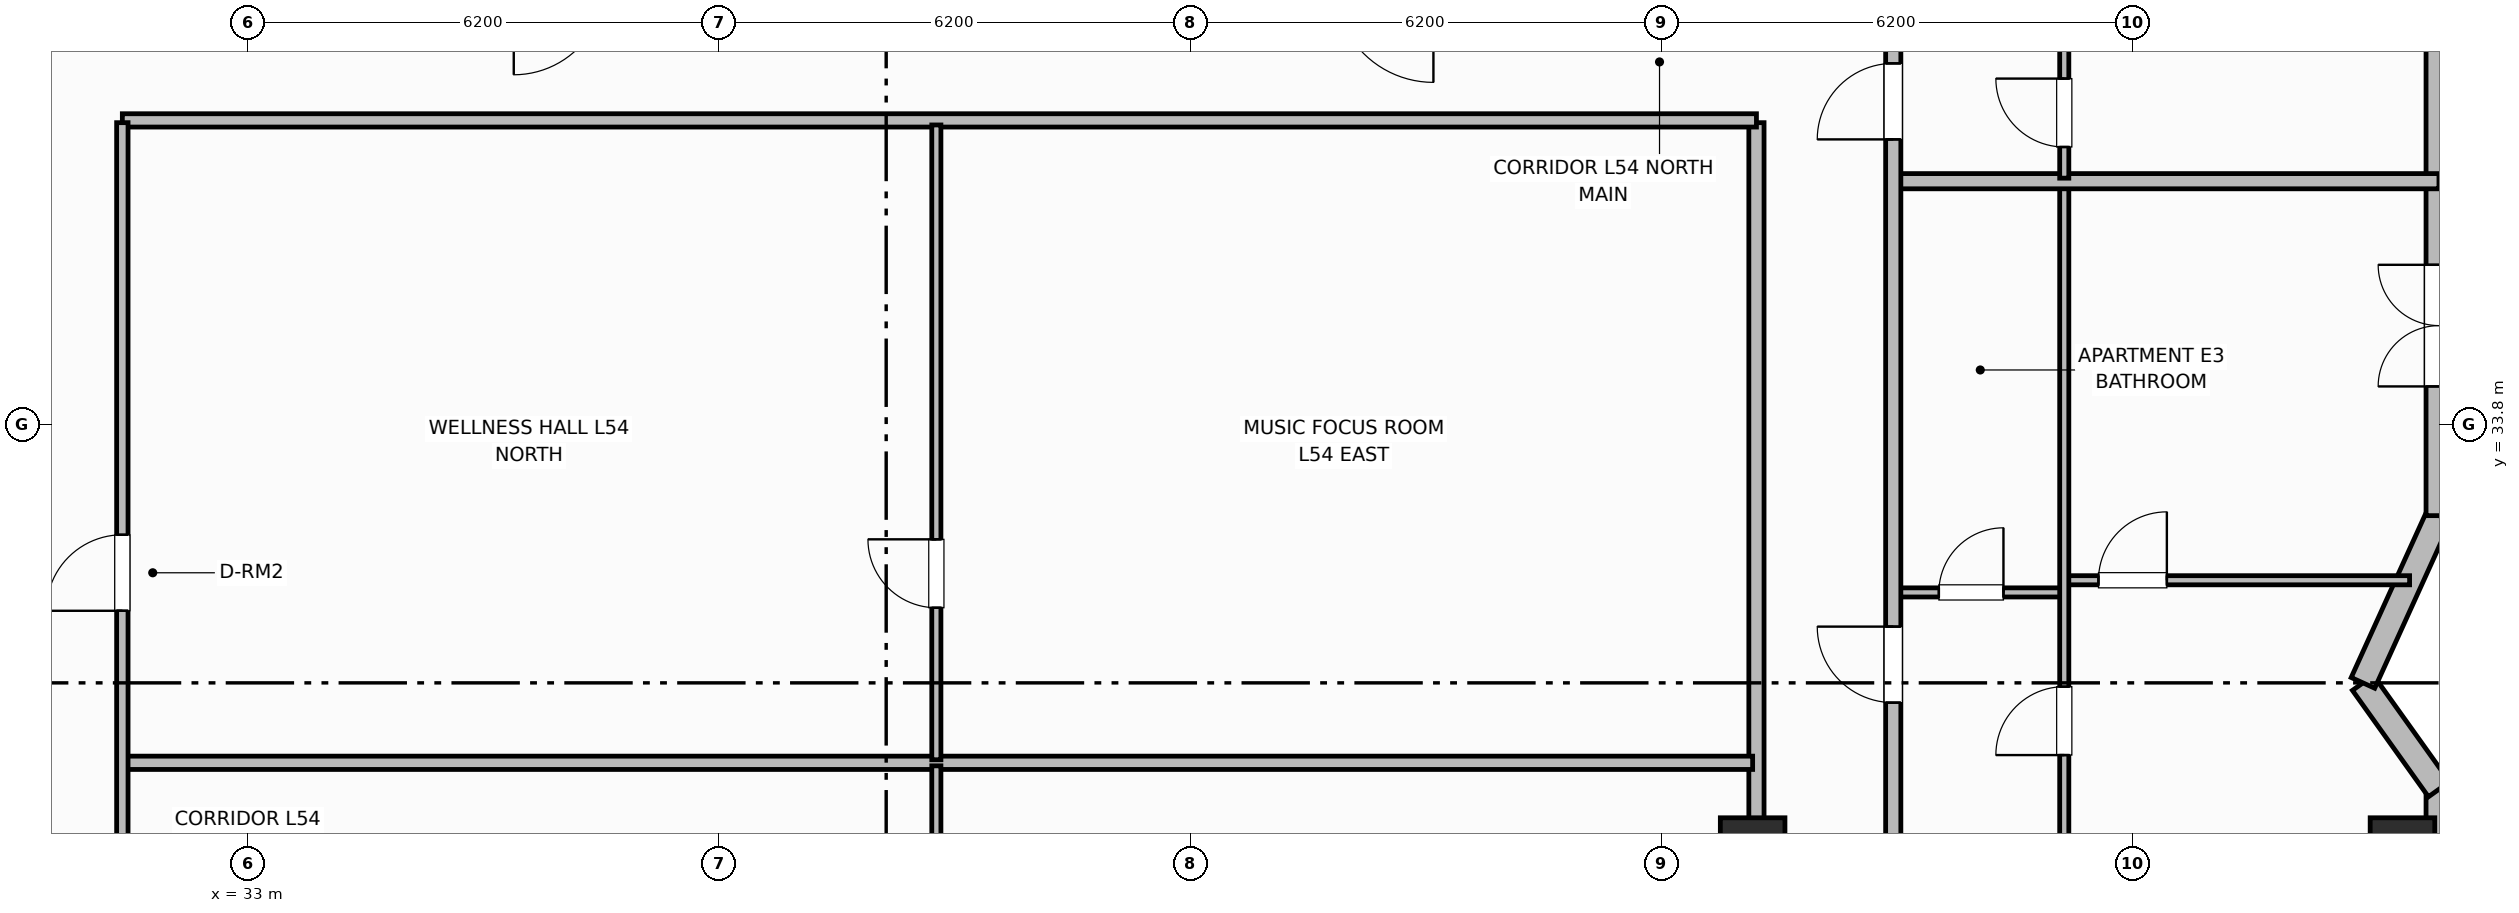
"""IFC4 building model, lengths in metres.
Left out: names, types, materials, properties, quantities, classifications, styles, units other than length and angle.
Written with IfcOpenShell. Run it as: python <this file> out.ifc"""

import sys

from ifc_helpers import new_model, si_unit, direction, frame, frame_2d, origin, origin_2d, place, context, subcontext, project, spatial, rectangle, extrude, element, fill, save


model = new_model("IFC4")
c1 = context("Model", 3, precision=1e-05, world=origin(), true_north=direction((0.0, 1.0)))
c2 = subcontext(c1, "Body", "Model", "MODEL_VIEW")
j1 = project(units=[si_unit("LENGTHUNIT", "METRE"), si_unit("PLANEANGLEUNIT", "RADIAN")], contexts=[c1])
p1 = place(None, origin())
s1 = spatial("IfcSite", under=j1, at=p1, CompositionType="ELEMENT")
p2 = place(p1, origin())
s2 = spatial("IfcBuilding", under=s1, at=p2, CompositionType="ELEMENT")
p3 = place(p2, frame((0.0, 0.0, 218.4)))
s3 = spatial("IfcBuildingStorey", under=s2, at=p3, CompositionType="ELEMENT", Elevation=218.4)
for number, where, z_axis, x_axis in (
    (1, (52.8, 28.2, 0.0), (0.0, 0.0, 1.0), (1.0, 0.0, 0.0)),
    (2, (61.35, 28.2, 0.0), (0.0, 0.0, 1.0), (1.0, 0.0, 0.0)),
):
    element("IfcColumn", number, at=place(p3, frame(where, z_axis=z_axis, x_axis=x_axis)), inside=s3, PredefinedType="COLUMN", context=c2, shape_type="SweptSolid", body=[
        extrude(rectangle(XDim=0.85, YDim=0.85, at=origin_2d()), origin(), (0.0, 0.0, 1.0), 3.7),
    ])
p4 = place(p3, frame((61.83, 27.4, 0.0), z_axis=(0.0, 0.0, 1.0), x_axis=(0.0, 1.0, 0.0)))
e3 = element("IfcWall", 3, at=p4, inside=s3, PredefinedType="SOLIDWALL", context=c2, shape_type="SweptSolid", body=[
    extrude(rectangle(XDim=1.6, YDim=0.34, at=frame_2d((0.8, 0.0))), origin(), (0.0, 0.0, 1.0), 2.72),
])
p5 = place(p3, frame((61.83, 29.0, 0.0), z_axis=(0.0, 0.0, 1.0), x_axis=(-0.581265041318, 0.813714293681, 0.0)))
e4 = element("IfcWall", 4, at=p5, inside=s3, PredefinedType="SOLIDWALL", context=c2, shape_type="SweptSolid", body=[
    extrude(rectangle(XDim=1.72, YDim=0.34, at=frame_2d((0.86, 0.0))), origin(), (0.0, 0.0, 1.0), 2.72),
])
p6 = place(p3, frame((60.83, 30.4, 0.0), z_axis=(0.0, 0.0, 1.0), x_axis=(0.413772500085, 0.910380315128, 0.0)))
e5 = element("IfcWall", 5, at=p6, inside=s3, PredefinedType="SOLIDWALL", context=c2, shape_type="SweptSolid", body=[
    extrude(rectangle(XDim=2.417, YDim=0.34, at=frame_2d((1.208, 0.0))), origin(), (0.0, 0.0, 1.0), 2.72),
])
p7 = place(p3, frame((61.83, 32.6, 0.0), z_axis=(0.0, 0.0, 1.0), x_axis=(0.0, 1.0, 0.0)))
e6 = element("IfcWall", 6, at=p7, inside=s3, PredefinedType="SOLIDWALL", context=c2, shape_type="SweptSolid", body=[
    extrude(rectangle(XDim=13.3, YDim=0.34, at=frame_2d((6.65, 0.0))), origin(), (0.0, 0.0, 1.0), 2.72),
])
p8 = place(p7, frame((1.7, 0.0, 0.0)))
e7 = element("IfcOpeningElement", 7, at=p8, cuts=e6, PredefinedType="OPENING", context=c2, shape_type="SweptSolid", body=[
    extrude(rectangle(XDim=1.6, YDim=2.1, at=frame_2d((0.8, 1.05))), frame((0.0, 0.18, 0.0), z_axis=(0.0, -1.0, 0.0), x_axis=(1.0, 0.0, 0.0)), (0.0, 0.0, 1.0), 0.36),
])
p9 = place(p7, frame((9.85, 0.0, 0.7)))
e8 = element("IfcOpeningElement", 8, at=p9, cuts=e6, PredefinedType="OPENING", context=c2, shape_type="SweptSolid", body=[
    extrude(rectangle(XDim=1.6, YDim=1.9, at=frame_2d((0.8, 0.95))), frame((0.0, 0.18, 0.0), z_axis=(0.0, -1.0, 0.0), x_axis=(1.0, 0.0, 0.0)), (0.0, 0.0, 1.0), 0.36),
])
p10 = place(p3, frame((52.85, 18.63, 0.0), z_axis=(0.0, 0.0, 1.0), x_axis=(0.0, 1.0, 0.0)))
e9 = element("IfcWall", 9, at=p10, inside=s3, PredefinedType="PARTITIONING", context=c2, shape_type="SweptSolid", body=[
    extrude(rectangle(XDim=19.14, YDim=0.2, at=frame_2d((9.57, 0.0))), origin(), (0.0, 0.0, 1.0), 2.55),
])
p11 = place(p3, frame((31.35, 37.8, 0.0), z_axis=(0.0, 0.0, 1.0), x_axis=(1.0, 0.0, 0.0)))
e10 = element("IfcWall", 10, at=p11, inside=s3, PredefinedType="PARTITIONING", context=c2, shape_type="SweptSolid", body=[
    extrude(rectangle(XDim=21.5, YDim=0.175, at=frame_2d((10.75, 0.0))), origin(), (0.0, 0.0, 1.0), 2.55),
])
p12 = place(p3, frame((31.38, 29.348, 0.0), z_axis=(0.0, 0.0, 1.0), x_axis=(1.0, 0.0, 0.0)))
e11 = element("IfcWall", 11, at=p12, inside=s3, PredefinedType="PARTITIONING", context=c2, shape_type="SweptSolid", body=[
    extrude(rectangle(XDim=21.42, YDim=0.175, at=frame_2d((10.71, 0.0))), origin(), (0.0, 0.0, 1.0), 2.55),
])
p13 = place(p3, frame((42.06, 18.66, 0.0), z_axis=(0.0, 0.0, 1.0), x_axis=(0.0, 1.0, 0.0)))
e12 = element("IfcWall", 12, at=p13, inside=s3, PredefinedType="PARTITIONING", context=c2, shape_type="SweptSolid", body=[
    extrude(rectangle(XDim=10.648, YDim=0.12, at=frame_2d((5.324, 0.0))), origin(), (0.0, 0.0, 1.0), 2.55),
])
p14 = place(p13, frame((2.0, 0.0, 0.0)))
e13 = element("IfcOpeningElement", 13, at=p14, cuts=e12, PredefinedType="OPENING", context=c2, shape_type="SweptSolid", body=[
    extrude(rectangle(XDim=0.9, YDim=2.1, at=frame_2d((0.45, 1.05))), frame((0.0, 0.07, 0.0), z_axis=(0.0, -1.0, 0.0), x_axis=(1.0, 0.0, 0.0)), (0.0, 0.0, 1.0), 0.14),
])
p15 = place(p3, frame((42.06, 29.388, 0.0), z_axis=(0.0, 0.0, 1.0), x_axis=(0.0, 1.0, 0.0)))
e14 = element("IfcWall", 14, at=p15, inside=s3, PredefinedType="PARTITIONING", context=c2, shape_type="SweptSolid", body=[
    extrude(rectangle(XDim=8.352, YDim=0.12, at=frame_2d((4.176, 0.0))), origin(), (0.0, 0.0, 1.0), 2.55),
])
p16 = place(p15, frame((2.0, 0.0, 0.0)))
e15 = element("IfcOpeningElement", 15, at=p16, cuts=e14, PredefinedType="OPENING", context=c2, shape_type="SweptSolid", body=[
    extrude(rectangle(XDim=0.9, YDim=2.1, at=frame_2d((0.45, 1.05))), frame((0.0, 0.07, 0.0), z_axis=(0.0, -1.0, 0.0), x_axis=(1.0, 0.0, 0.0)), (0.0, 0.0, 1.0), 0.14),
])
p17 = place(p3, frame((31.35, 18.63, 0.0), z_axis=(0.0, 0.0, 1.0), x_axis=(0.0, 1.0, 0.0)))
e16 = element("IfcWall", 16, at=p17, inside=s3, PredefinedType="PARTITIONING", context=c2, shape_type="SweptSolid", body=[
    extrude(rectangle(XDim=19.14, YDim=0.15, at=frame_2d((9.57, 0.0))), origin(), (0.0, 0.0, 1.0), 2.55),
])
p18 = place(p17, frame((2.2, 0.0, 0.0)))
e17 = element("IfcOpeningElement", 17, at=p18, cuts=e16, PredefinedType="OPENING", context=c2, shape_type="SweptSolid", body=[
    extrude(rectangle(XDim=1.0, YDim=2.15, at=frame_2d((0.5, 1.075))), frame((0.0, 0.085, 0.0), z_axis=(0.0, -1.0, 0.0), x_axis=(1.0, 0.0, 0.0)), (0.0, 0.0, 1.0), 0.17),
])
p19 = place(p17, frame((12.719, 0.0, 0.0)))
e18 = element("IfcOpeningElement", 18, at=p19, cuts=e16, PredefinedType="OPENING", context=c2, shape_type="SweptSolid", body=[
    extrude(rectangle(XDim=1.0, YDim=2.15, at=frame_2d((0.5, 1.075))), frame((0.0, 0.085, 0.0), z_axis=(0.0, -1.0, 0.0), x_axis=(1.0, 0.0, 0.0)), (0.0, 0.0, 1.0), 0.17),
])
p20 = place(p3, frame((54.65, 31.59, 0.0), z_axis=(0.0, 0.0, 1.0), x_axis=(1.0, 0.0, 0.0)))
e19 = element("IfcWall", 19, at=p20, inside=s3, PredefinedType="PARTITIONING", context=c2, shape_type="SweptSolid", body=[
    extrude(rectangle(XDim=2.25, YDim=0.12, at=frame_2d((1.125, 0.0))), origin(), (0.0, 0.0, 1.0), 2.55),
])
p21 = place(p20, frame((0.6, 0.0, 0.0)))
e20 = element("IfcOpeningElement", 20, at=p21, cuts=e19, PredefinedType="OPENING", context=c2, shape_type="SweptSolid", body=[
    extrude(rectangle(XDim=0.85, YDim=2.1, at=frame_2d((0.425, 1.05))), frame((0.0, 0.07, 0.0), z_axis=(0.0, -1.0, 0.0), x_axis=(1.0, 0.0, 0.0)), (0.0, 0.0, 1.0), 0.14),
])
p22 = place(p3, frame((56.9, 31.75, 0.0), z_axis=(0.0, 0.0, 1.0), x_axis=(1.0, 0.0, 0.0)))
e21 = element("IfcWall", 21, at=p22, inside=s3, PredefinedType="PARTITIONING", context=c2, shape_type="SweptSolid", body=[
    extrude(rectangle(XDim=4.544, YDim=0.12, at=frame_2d((2.272, 0.0))), origin(), (0.0, 0.0, 1.0), 2.55),
])
p23 = place(p22, frame((0.45, 0.0, 0.0)))
e22 = element("IfcOpeningElement", 22, at=p23, cuts=e21, PredefinedType="OPENING", context=c2, shape_type="SweptSolid", body=[
    extrude(rectangle(XDim=0.9, YDim=2.1, at=frame_2d((0.45, 1.05))), frame((0.0, 0.07, 0.0), z_axis=(0.0, -1.0, 0.0), x_axis=(1.0, 0.0, 0.0)), (0.0, 0.0, 1.0), 0.14),
])
p24 = place(p3, frame((56.9, 26.64, 0.0), z_axis=(0.0, 0.0, 1.0), x_axis=(0.0, 1.0, 0.0)))
e23 = element("IfcWall", 23, at=p24, inside=s3, PredefinedType="PARTITIONING", context=c2, shape_type="SweptSolid", body=[
    extrude(rectangle(XDim=10.32, YDim=0.12, at=frame_2d((5.16, 0.0))), origin(), (0.0, 0.0, 1.0), 2.55),
])
p25 = place(p24, frame((2.81, 0.0, 0.0)))
e24 = element("IfcOpeningElement", 24, at=p25, cuts=e23, PredefinedType="OPENING", context=c2, shape_type="SweptSolid", body=[
    extrude(rectangle(XDim=0.9, YDim=2.1, at=frame_2d((0.45, 1.05))), frame((0.0, 0.07, 0.0), z_axis=(0.0, -1.0, 0.0), x_axis=(1.0, 0.0, 0.0)), (0.0, 0.0, 1.0), 0.14),
])
p26 = place(p3, frame((54.65, 37.0, 0.0), z_axis=(0.0, 0.0, 1.0), x_axis=(1.0, 0.0, 0.0)))
e25 = element("IfcWall", 25, at=p26, inside=s3, PredefinedType="PARTITIONING", context=c2, shape_type="SweptSolid", body=[
    extrude(rectangle(XDim=7.18, YDim=0.2, at=frame_2d((3.59, 0.0))), origin(), (0.0, 0.0, 1.0), 2.55),
])
p27 = place(p3, frame((56.9, 37.04, 0.0), z_axis=(0.0, 0.0, 1.0), x_axis=(0.0, 1.0, 0.0)))
e26 = element("IfcWall", 26, at=p27, inside=s3, PredefinedType="PARTITIONING", context=c2, shape_type="SweptSolid", body=[
    extrude(rectangle(XDim=8.72, YDim=0.12, at=frame_2d((4.36, 0.0))), origin(), (0.0, 0.0, 1.0), 2.55),
])
p28 = place(p27, frame((0.41, 0.0, 0.0)))
e27 = element("IfcOpeningElement", 27, at=p28, cuts=e26, PredefinedType="OPENING", context=c2, shape_type="SweptSolid", body=[
    extrude(rectangle(XDim=0.9, YDim=2.1, at=frame_2d((0.45, 1.05))), frame((0.0, 0.07, 0.0), z_axis=(0.0, -1.0, 0.0), x_axis=(1.0, 0.0, 0.0)), (0.0, 0.0, 1.0), 0.14),
])
p29 = place(p3, frame((54.65, 10.6, 0.0), z_axis=(0.0, 0.0, 1.0), x_axis=(0.0, 1.0, 0.0)))
e28 = element("IfcWall", 28, at=p29, inside=s3, PredefinedType="PARTITIONING", context=c2, shape_type="SweptSolid", body=[
    extrude(rectangle(XDim=35.2, YDim=0.2, at=frame_2d((17.6, 0.0))), origin(), (0.0, 0.0, 1.0), 2.55),
])
p30 = place(p29, frame((2.65, 0.0, 0.0)))
e29 = element("IfcOpeningElement", 29, at=p30, cuts=e28, PredefinedType="OPENING", context=c2, shape_type="SweptSolid", body=[
    extrude(rectangle(XDim=1.0, YDim=2.15, at=frame_2d((0.5, 1.075))), frame((0.0, 0.11, 0.0), z_axis=(0.0, -1.0, 0.0), x_axis=(1.0, 0.0, 0.0)), (0.0, 0.0, 1.0), 0.22),
])
p31 = place(p29, frame((10.81, 0.0, 0.0)))
e30 = element("IfcOpeningElement", 30, at=p31, cuts=e28, PredefinedType="OPENING", context=c2, shape_type="SweptSolid", body=[
    extrude(rectangle(XDim=1.0, YDim=2.15, at=frame_2d((0.5, 1.075))), frame((0.0, 0.11, 0.0), z_axis=(0.0, -1.0, 0.0), x_axis=(1.0, 0.0, 0.0)), (0.0, 0.0, 1.0), 0.22),
])
p32 = place(p29, frame((19.54, 0.0, 0.0)))
e31 = element("IfcOpeningElement", 31, at=p32, cuts=e28, PredefinedType="OPENING", context=c2, shape_type="SweptSolid", body=[
    extrude(rectangle(XDim=1.0, YDim=2.15, at=frame_2d((0.5, 1.075))), frame((0.0, 0.11, 0.0), z_axis=(0.0, -1.0, 0.0), x_axis=(1.0, 0.0, 0.0)), (0.0, 0.0, 1.0), 0.22),
])
p33 = place(p29, frame((26.95, 0.0, 0.0)))
e32 = element("IfcOpeningElement", 32, at=p33, cuts=e28, PredefinedType="OPENING", context=c2, shape_type="SweptSolid", body=[
    extrude(rectangle(XDim=1.0, YDim=2.15, at=frame_2d((0.5, 1.075))), frame((0.0, 0.11, 0.0), z_axis=(0.0, -1.0, 0.0), x_axis=(1.0, 0.0, 0.0)), (0.0, 0.0, 1.0), 0.22),
])
p34 = place(p8, origin())
e33 = element("IfcDoor", 33, at=p34, inside=s3, OperationType="DOUBLE_DOOR_SINGLE_SWING", PredefinedType="DOOR", context=c2, shape_type="SweptSolid", body=[
    extrude(rectangle(XDim=1.6, YDim=2.1, at=frame_2d((0.8, 1.05))), frame((0.0, 0.025, 0.0), z_axis=(0.0, -1.0, 0.0), x_axis=(1.0, 0.0, 0.0)), (0.0, 0.0, 1.0), 0.05),
])
fill(e7, e33)
p35 = place(p16, origin())
e34 = element("IfcDoor", 34, at=p35, inside=s3, OperationType="SINGLE_SWING_RIGHT", PredefinedType="DOOR", context=c2, shape_type="SweptSolid", body=[
    extrude(rectangle(XDim=0.9, YDim=2.1, at=frame_2d((0.45, 1.05))), frame((0.0, 0.025, 0.0), z_axis=(0.0, -1.0, 0.0), x_axis=(1.0, 0.0, 0.0)), (0.0, 0.0, 1.0), 0.05),
])
fill(e15, e34)
p36 = place(p19, origin())
e35 = element("IfcDoor", 35, at=p36, inside=s3, OperationType="SINGLE_SWING_LEFT", PredefinedType="DOOR", context=c2, shape_type="SweptSolid", body=[
    extrude(rectangle(XDim=1.0, YDim=2.15, at=frame_2d((0.5, 1.075))), frame((0.0, 0.025, 0.0), z_axis=(0.0, -1.0, 0.0), x_axis=(1.0, 0.0, 0.0)), (0.0, 0.0, 1.0), 0.05),
])
fill(e18, e35)
p37 = place(p21, origin())
e36 = element("IfcDoor", 36, at=p37, inside=s3, OperationType="SINGLE_SWING_RIGHT", PredefinedType="DOOR", context=c2, shape_type="SweptSolid", body=[
    extrude(rectangle(XDim=0.85, YDim=2.1, at=frame_2d((0.425, 1.05))), frame((0.0, 0.025, 0.0), z_axis=(0.0, -1.0, 0.0), x_axis=(1.0, 0.0, 0.0)), (0.0, 0.0, 1.0), 0.05),
])
fill(e20, e36)
p38 = place(p23, origin())
e37 = element("IfcDoor", 37, at=p38, inside=s3, OperationType="SINGLE_SWING_RIGHT", PredefinedType="DOOR", context=c2, shape_type="SweptSolid", body=[
    extrude(rectangle(XDim=0.9, YDim=2.1, at=frame_2d((0.45, 1.05))), frame((0.0, 0.025, 0.0), z_axis=(0.0, -1.0, 0.0), x_axis=(1.0, 0.0, 0.0)), (0.0, 0.0, 1.0), 0.05),
])
fill(e22, e37)
p39 = place(p25, origin())
e38 = element("IfcDoor", 38, at=p39, inside=s3, OperationType="SINGLE_SWING_LEFT", PredefinedType="DOOR", context=c2, shape_type="SweptSolid", body=[
    extrude(rectangle(XDim=0.9, YDim=2.1, at=frame_2d((0.45, 1.05))), frame((0.0, 0.025, 0.0), z_axis=(0.0, -1.0, 0.0), x_axis=(1.0, 0.0, 0.0)), (0.0, 0.0, 1.0), 0.05),
])
fill(e24, e38)
p40 = place(p28, origin())
e39 = element("IfcDoor", 39, at=p40, inside=s3, OperationType="SINGLE_SWING_RIGHT", PredefinedType="DOOR", context=c2, shape_type="SweptSolid", body=[
    extrude(rectangle(XDim=0.9, YDim=2.1, at=frame_2d((0.45, 1.05))), frame((0.0, 0.025, 0.0), z_axis=(0.0, -1.0, 0.0), x_axis=(1.0, 0.0, 0.0)), (0.0, 0.0, 1.0), 0.05),
])
fill(e27, e39)
p41 = place(p32, origin())
e40 = element("IfcDoor", 40, at=p41, inside=s3, OperationType="SINGLE_SWING_RIGHT", PredefinedType="DOOR", context=c2, shape_type="SweptSolid", body=[
    extrude(rectangle(XDim=1.0, YDim=2.15, at=frame_2d((0.5, 1.075))), frame((0.0, 0.025, 0.0), z_axis=(0.0, -1.0, 0.0), x_axis=(1.0, 0.0, 0.0)), (0.0, 0.0, 1.0), 0.05),
])
fill(e31, e40)
p42 = place(p33, origin())
e41 = element("IfcDoor", 41, at=p42, inside=s3, OperationType="SINGLE_SWING_LEFT", PredefinedType="DOOR", context=c2, shape_type="SweptSolid", body=[
    extrude(rectangle(XDim=1.0, YDim=2.15, at=frame_2d((0.5, 1.075))), frame((0.0, 0.025, 0.0), z_axis=(0.0, -1.0, 0.0), x_axis=(1.0, 0.0, 0.0)), (0.0, 0.0, 1.0), 0.05),
])
fill(e32, e41)
save(model, sys.argv[1])
